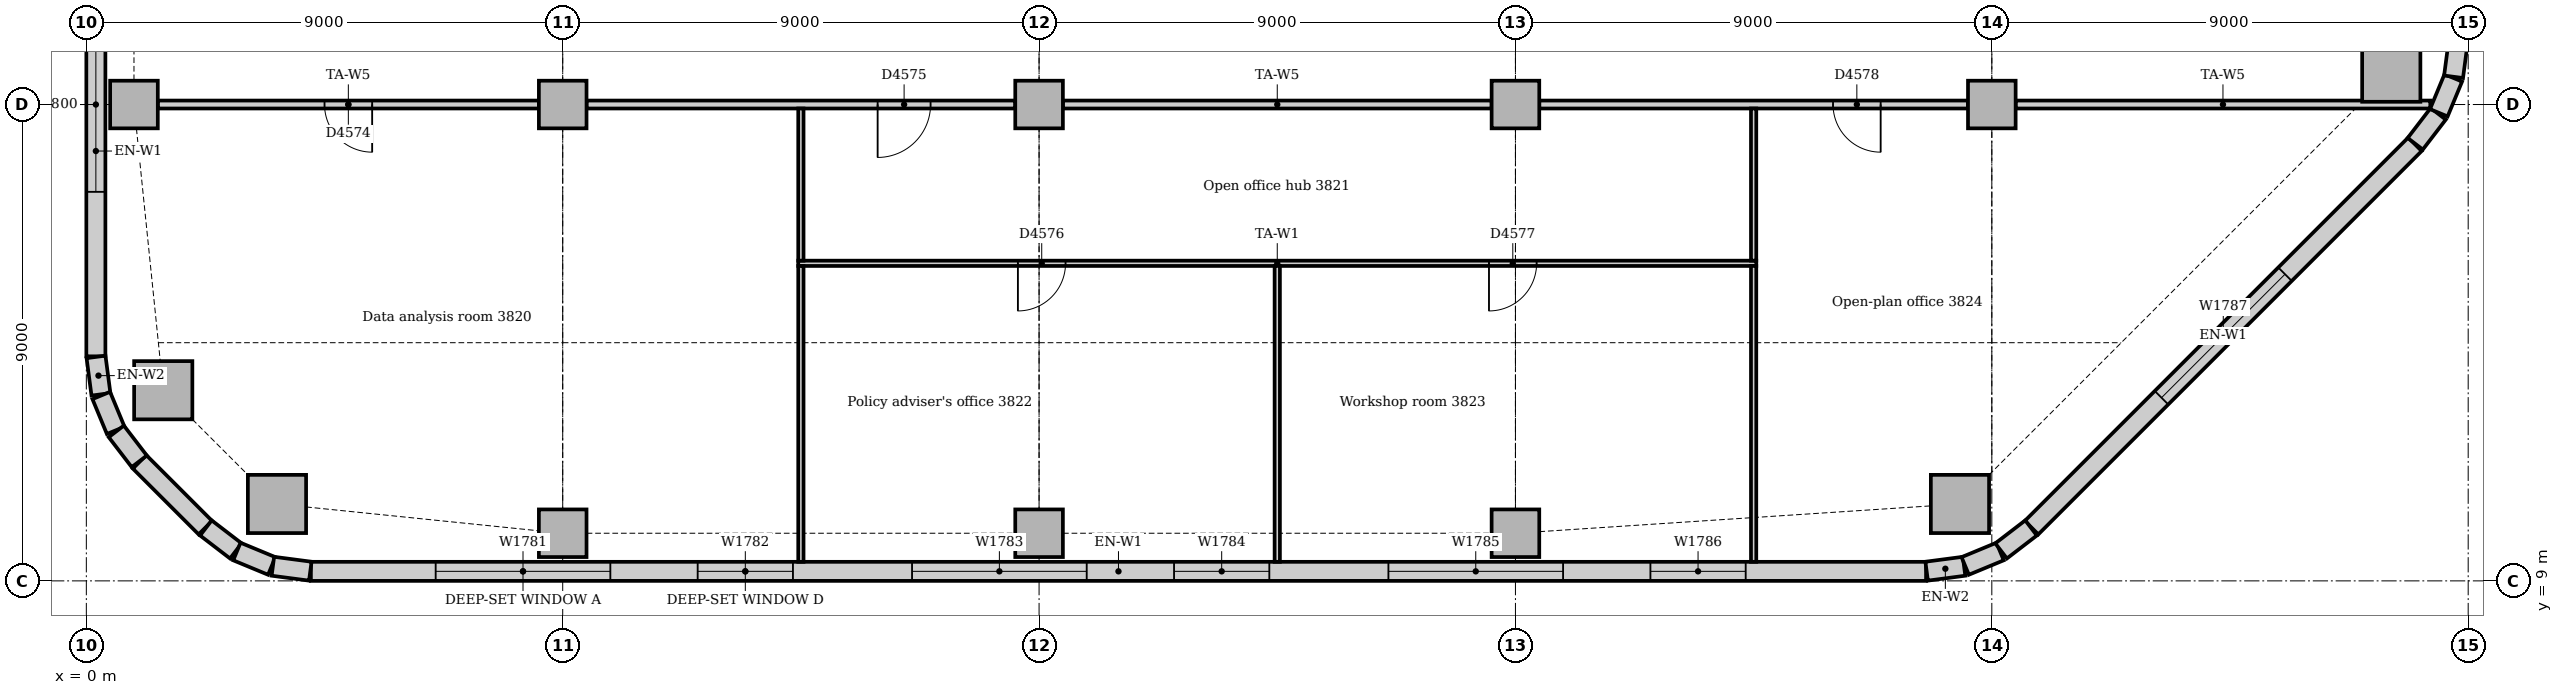
"""IFC4 building model, lengths in metres.
Left out: names, types, materials, properties, quantities, classifications, styles, units other than length and angle.
Written with IfcOpenShell. Run it as: python <this file> out.ifc"""

import sys

from ifc_helpers import new_model, si_unit, direction, frame, frame_2d, origin, origin_2d, place, context, subcontext, project, spatial, rectangle, extrude, element, fill, save


model = new_model("IFC4")
c1 = context("Model", 3, precision=1e-05, world=origin(), true_north=direction((0.0, 1.0)))
c2 = subcontext(c1, "Body", "Model", "MODEL_VIEW")
j1 = project(units=[si_unit("LENGTHUNIT", "METRE"), si_unit("PLANEANGLEUNIT", "RADIAN")], contexts=[c1])
p1 = place(None, origin())
s1 = spatial("IfcSite", under=j1, at=p1, CompositionType="ELEMENT")
p2 = place(p1, origin())
s2 = spatial("IfcBuilding", under=s1, at=p2, CompositionType="ELEMENT")
p3 = place(p2, frame((0.0, 0.0, 161.0)))
s3 = spatial("IfcBuildingStorey", under=s2, at=p3, CompositionType="ELEMENT", Elevation=161.0)
for number, where, z_axis, x_axis in (
    (1, (3.602, 10.453, 0.0), (0.0, 0.0, 1.0), (1.0, 0.0, 0.0)),
    (2, (35.398, 10.453, 0.0), (0.0, 0.0, 1.0), (1.0, 0.0, 0.0)),
    (3, (43.547, 18.602, 0.0), (0.0, 0.0, 1.0), (1.0, 0.0, 0.0)),
    (4, (1.453, 12.602, 0.0), (0.0, 0.0, 1.0), (1.0, 0.0, 0.0)),
):
    element("IfcColumn", number, at=place(p3, frame(where, z_axis=z_axis, x_axis=x_axis)), inside=s3, PredefinedType="COLUMN", context=c2, shape_type="SweptSolid", body=[
        extrude(rectangle(XDim=1.1, YDim=1.1, at=origin_2d()), origin(), (0.0, 0.0, 1.0), 3.85),
    ])
for number, where, z_axis, x_axis in (
    (5, (9.0, 9.9, 0.0), (0.0, 0.0, 1.0), (1.0, 0.0, 0.0)),
    (6, (18.0, 9.9, 0.0), (0.0, 0.0, 1.0), (1.0, 0.0, 0.0)),
    (7, (27.0, 9.9, 0.0), (0.0, 0.0, 1.0), (1.0, 0.0, 0.0)),
    (8, (0.9, 18.0, 0.0), (0.0, 0.0, 1.0), (1.0, 0.0, 0.0)),
    (9, (9.0, 18.0, 0.0), (0.0, 0.0, 1.0), (1.0, 0.0, 0.0)),
    (10, (18.0, 18.0, 0.0), (0.0, 0.0, 1.0), (1.0, 0.0, 0.0)),
    (11, (27.0, 18.0, 0.0), (0.0, 0.0, 1.0), (1.0, 0.0, 0.0)),
    (12, (36.0, 18.0, 0.0), (0.0, 0.0, 1.0), (1.0, 0.0, 0.0)),
):
    element("IfcColumn", number, at=place(p3, frame(where, z_axis=z_axis, x_axis=x_axis)), inside=s3, PredefinedType="COLUMN", context=c2, shape_type="SweptSolid", body=[
        extrude(rectangle(XDim=0.9, YDim=0.9, at=origin_2d()), origin(), (0.0, 0.0, 1.0), 3.85),
    ])
p4 = place(p3, frame((4.243, 9.18, 0.0), z_axis=(0.0, 0.0, 1.0), x_axis=(1.0, 0.0, 0.0)))
e13 = element("IfcWall", 13, at=p4, inside=s3, PredefinedType="STANDARD", context=c2, shape_type="SweptSolid", body=[
    extrude(rectangle(XDim=30.515, YDim=0.36, at=frame_2d((15.257, 0.0))), origin(), (0.0, 0.0, 1.0), 3.85),
])
p5 = place(p4, frame((2.357, 0.0, 0.9)))
e14 = element("IfcOpeningElement", 14, at=p5, cuts=e13, PredefinedType="OPENING", context=c2, shape_type="SweptSolid", body=[
    extrude(rectangle(XDim=3.3, YDim=1.6, at=frame_2d((1.65, 0.8))), frame((0.0, 0.19, 0.0), z_axis=(0.0, -1.0, 0.0), x_axis=(1.0, 0.0, 0.0)), (0.0, 0.0, 1.0), 0.38),
])
p6 = place(p4, frame((7.307, 0.0, 0.9)))
e15 = element("IfcOpeningElement", 15, at=p6, cuts=e13, PredefinedType="OPENING", context=c2, shape_type="SweptSolid", body=[
    extrude(rectangle(XDim=1.8, YDim=1.6, at=frame_2d((0.9, 0.8))), frame((0.0, 0.19, 0.0), z_axis=(0.0, -1.0, 0.0), x_axis=(1.0, 0.0, 0.0)), (0.0, 0.0, 1.0), 0.38),
])
p7 = place(p4, frame((11.357, 0.0, 0.9)))
e16 = element("IfcOpeningElement", 16, at=p7, cuts=e13, PredefinedType="OPENING", context=c2, shape_type="SweptSolid", body=[
    extrude(rectangle(XDim=3.3, YDim=1.6, at=frame_2d((1.65, 0.8))), frame((0.0, 0.19, 0.0), z_axis=(0.0, -1.0, 0.0), x_axis=(1.0, 0.0, 0.0)), (0.0, 0.0, 1.0), 0.38),
])
p8 = place(p4, frame((16.307, 0.0, 0.9)))
e17 = element("IfcOpeningElement", 17, at=p8, cuts=e13, PredefinedType="OPENING", context=c2, shape_type="SweptSolid", body=[
    extrude(rectangle(XDim=1.8, YDim=1.6, at=frame_2d((0.9, 0.8))), frame((0.0, 0.19, 0.0), z_axis=(0.0, -1.0, 0.0), x_axis=(1.0, 0.0, 0.0)), (0.0, 0.0, 1.0), 0.38),
])
p9 = place(p4, frame((20.357, 0.0, 0.9)))
e18 = element("IfcOpeningElement", 18, at=p9, cuts=e13, PredefinedType="OPENING", context=c2, shape_type="SweptSolid", body=[
    extrude(rectangle(XDim=3.3, YDim=1.6, at=frame_2d((1.65, 0.8))), frame((0.0, 0.19, 0.0), z_axis=(0.0, -1.0, 0.0), x_axis=(1.0, 0.0, 0.0)), (0.0, 0.0, 1.0), 0.38),
])
p10 = place(p4, frame((25.307, 0.0, 0.9)))
e19 = element("IfcOpeningElement", 19, at=p10, cuts=e13, PredefinedType="OPENING", context=c2, shape_type="SweptSolid", body=[
    extrude(rectangle(XDim=1.8, YDim=1.6, at=frame_2d((0.9, 0.8))), frame((0.0, 0.19, 0.0), z_axis=(0.0, -1.0, 0.0), x_axis=(1.0, 0.0, 0.0)), (0.0, 0.0, 1.0), 0.38),
])
p11 = place(p3, frame((36.751, 10.006, 0.0), z_axis=(0.0, 0.0, 1.0), x_axis=(0.707106781187, 0.707106781187, 0.0)))
e20 = element("IfcWall", 20, at=p11, inside=s3, PredefinedType="STANDARD", context=c2, shape_type="SweptSolid", body=[
    extrude(rectangle(XDim=10.243, YDim=0.36, at=frame_2d((5.121, 0.0))), origin(), (0.0, 0.0, 1.0), 3.85),
])
p12 = place(p11, frame((3.471, 0.0, 0.9)))
e21 = element("IfcOpeningElement", 21, at=p12, cuts=e20, PredefinedType="OPENING", context=c2, shape_type="SweptSolid", body=[
    extrude(rectangle(XDim=3.3, YDim=1.6, at=frame_2d((1.65, 0.8))), frame((0.0, 0.19, 0.0), z_axis=(0.0, -1.0, 0.0), x_axis=(1.0, 0.0, 0.0)), (0.0, 0.0, 1.0), 0.38),
])
p13 = place(p3, frame((0.18, 21.0, 0.0), z_axis=(0.0, 0.0, 1.0), x_axis=(0.0, -1.0, 0.0)))
e22 = element("IfcWall", 22, at=p13, inside=s3, PredefinedType="STANDARD", context=c2, shape_type="SweptSolid", body=[
    extrude(rectangle(XDim=7.757, YDim=0.36, at=frame_2d((3.879, 0.0))), origin(), (0.0, 0.0, 1.0), 3.85),
])
p14 = place(p13, frame((1.35, 0.0, 0.9)))
e23 = element("IfcOpeningElement", 23, at=p14, cuts=e22, PredefinedType="OPENING", context=c2, shape_type="SweptSolid", body=[
    extrude(rectangle(XDim=3.3, YDim=1.6, at=frame_2d((1.65, 0.8))), frame((0.0, 0.19, 0.0), z_axis=(0.0, -1.0, 0.0), x_axis=(1.0, 0.0, 0.0)), (0.0, 0.0, 1.0), 0.38),
])
p15 = place(p3, frame((1.006, 11.249, 0.0), z_axis=(0.0, 0.0, 1.0), x_axis=(0.707106781187, -0.707106781187, 0.0)))
e24 = element("IfcWall", 24, at=p15, inside=s3, PredefinedType="STANDARD", context=c2, shape_type="SweptSolid", body=[
    extrude(rectangle(XDim=1.757, YDim=0.36, at=frame_2d((0.879, 0.0))), origin(), (0.0, 0.0, 1.0), 3.85),
])
for number, where, z_axis, x_axis in (
    (25, (34.769, 9.183, 0.0), (0.0, 0.0, 1.0), (0.991, 0.131, 0.0)),
    (26, (35.497, 9.282, 0.0), (0.0, 0.0, 1.0), (0.924, 0.383, 0.0)),
):
    element("IfcWall", number, at=place(p3, frame(where, z_axis=z_axis, x_axis=x_axis)), inside=s3, PredefinedType="STANDARD", context=c2, shape_type="SweptSolid", body=[
        extrude(rectangle(XDim=0.713, YDim=0.36, at=frame_2d((0.356, 0.0))), origin(), (0.0, 0.0, 1.0), 3.85),
    ])
for number, where, z_axis, x_axis in (
    (27, (36.175, 9.566, 0.0), (0.0, 0.0, 1.0), (0.793, 0.609, 0.0)),
    (28, (44.0, 17.259, 0.0), (0.0, 0.0, 1.0), (0.609, 0.793, 0.0)),
):
    element("IfcWall", number, at=place(p3, frame(where, z_axis=z_axis, x_axis=x_axis)), inside=s3, PredefinedType="STANDARD", context=c2, shape_type="SweptSolid", body=[
        extrude(rectangle(XDim=0.713, YDim=0.36, at=frame_2d((0.357, 0.0))), origin(), (0.0, 0.0, 1.0), 3.85),
    ])
for number, where, z_axis, x_axis in (
    (29, (44.445, 17.844, 0.0), (0.0, 0.0, 1.0), (0.383, 0.924, 0.0)),
    (30, (44.724, 18.524, 0.0), (0.0, 0.0, 1.0), (0.131, 0.991, 0.0)),
    (31, (0.183, 13.231, 0.0), (0.0, 0.0, 1.0), (0.131, -0.991, 0.0)),
    (32, (0.282, 12.503, 0.0), (0.0, 0.0, 1.0), (0.383, -0.924, 0.0)),
):
    element("IfcWall", number, at=place(p3, frame(where, z_axis=z_axis, x_axis=x_axis)), inside=s3, PredefinedType="STANDARD", context=c2, shape_type="SweptSolid", body=[
        extrude(rectangle(XDim=0.713, YDim=0.36, at=frame_2d((0.356, 0.0))), origin(), (0.0, 0.0, 1.0), 3.85),
    ])
for number, where, z_axis, x_axis in (
    (33, (0.566, 11.825, 0.0), (0.0, 0.0, 1.0), (0.609, -0.793, 0.0)),
    (34, (2.259, 10.0, 0.0), (0.0, 0.0, 1.0), (0.793, -0.609, 0.0)),
):
    element("IfcWall", number, at=place(p3, frame(where, z_axis=z_axis, x_axis=x_axis)), inside=s3, PredefinedType="STANDARD", context=c2, shape_type="SweptSolid", body=[
        extrude(rectangle(XDim=0.713, YDim=0.36, at=frame_2d((0.357, 0.0))), origin(), (0.0, 0.0, 1.0), 3.85),
    ])
for number, where, z_axis, x_axis in (
    (35, (2.844, 9.555, 0.0), (0.0, 0.0, 1.0), (0.924, -0.383, 0.0)),
    (36, (3.524, 9.276, 0.0), (0.0, 0.0, 1.0), (0.991, -0.131, 0.0)),
):
    element("IfcWall", number, at=place(p3, frame(where, z_axis=z_axis, x_axis=x_axis)), inside=s3, PredefinedType="STANDARD", context=c2, shape_type="SweptSolid", body=[
        extrude(rectangle(XDim=0.713, YDim=0.36, at=frame_2d((0.356, 0.0))), origin(), (0.0, 0.0, 1.0), 3.85),
    ])
p16 = place(p3, frame((1.35, 18.0, 0.0), z_axis=(0.0, 0.0, 1.0), x_axis=(1.0, 0.0, 0.0)))
e37 = element("IfcWall", 37, at=p16, inside=s3, PredefinedType="PARTITIONING", context=c2, shape_type="SweptSolid", body=[
    extrude(rectangle(XDim=7.2, YDim=0.15, at=frame_2d((3.6, 0.0))), origin(), (0.0, 0.0, 1.0), 3.262),
])
p17 = place(p16, frame((3.15, 0.0, 0.0)))
e38 = element("IfcOpeningElement", 38, at=p17, cuts=e37, PredefinedType="OPENING", context=c2, shape_type="SweptSolid", body=[
    extrude(rectangle(XDim=0.9, YDim=2.1, at=frame_2d((0.45, 1.05))), frame((0.0, 0.085, 0.0), z_axis=(0.0, -1.0, 0.0), x_axis=(1.0, 0.0, 0.0)), (0.0, 0.0, 1.0), 0.17),
])
p18 = place(p3, frame((9.45, 18.0, 0.0), z_axis=(0.0, 0.0, 1.0), x_axis=(1.0, 0.0, 0.0)))
e39 = element("IfcWall", 39, at=p18, inside=s3, PredefinedType="PARTITIONING", context=c2, shape_type="SweptSolid", body=[
    extrude(rectangle(XDim=8.1, YDim=0.15, at=frame_2d((4.05, 0.0))), origin(), (0.0, 0.0, 1.0), 3.262),
])
p19 = place(p18, frame((5.5, 0.0, 0.0)))
e40 = element("IfcOpeningElement", 40, at=p19, cuts=e39, PredefinedType="OPENING", context=c2, shape_type="SweptSolid", body=[
    extrude(rectangle(XDim=1.0, YDim=2.1, at=frame_2d((0.5, 1.05))), frame((0.0, 0.085, 0.0), z_axis=(0.0, -1.0, 0.0), x_axis=(1.0, 0.0, 0.0)), (0.0, 0.0, 1.0), 0.17),
])
p20 = place(p3, frame((18.45, 18.0, 0.0), z_axis=(0.0, 0.0, 1.0), x_axis=(1.0, 0.0, 0.0)))
e41 = element("IfcWall", 41, at=p20, inside=s3, PredefinedType="PARTITIONING", context=c2, shape_type="SweptSolid", body=[
    extrude(rectangle(XDim=8.1, YDim=0.15, at=frame_2d((4.05, 0.0))), origin(), (0.0, 0.0, 1.0), 3.262),
])
p21 = place(p3, frame((27.45, 18.0, 0.0), z_axis=(0.0, 0.0, 1.0), x_axis=(1.0, 0.0, 0.0)))
e42 = element("IfcWall", 42, at=p21, inside=s3, PredefinedType="PARTITIONING", context=c2, shape_type="SweptSolid", body=[
    extrude(rectangle(XDim=8.1, YDim=0.15, at=frame_2d((4.05, 0.0))), origin(), (0.0, 0.0, 1.0), 3.262),
])
p22 = place(p21, frame((5.55, 0.0, 0.0)))
e43 = element("IfcOpeningElement", 43, at=p22, cuts=e42, PredefinedType="OPENING", context=c2, shape_type="SweptSolid", body=[
    extrude(rectangle(XDim=0.9, YDim=2.1, at=frame_2d((0.45, 1.05))), frame((0.0, 0.085, 0.0), z_axis=(0.0, -1.0, 0.0), x_axis=(1.0, 0.0, 0.0)), (0.0, 0.0, 1.0), 0.17),
])
p23 = place(p3, frame((36.45, 18.0, 0.0), z_axis=(0.0, 0.0, 1.0), x_axis=(1.0, 0.0, 0.0)))
e44 = element("IfcWall", 44, at=p23, inside=s3, PredefinedType="PARTITIONING", context=c2, shape_type="SweptSolid", body=[
    extrude(rectangle(XDim=7.834, YDim=0.15, at=frame_2d((3.917, 0.0))), origin(), (0.0, 0.0, 1.0), 3.35),
])
p24 = place(p3, frame((13.45, 15.0, 0.0), z_axis=(0.0, 0.0, 1.0), x_axis=(1.0, 0.0, 0.0)))
e45 = element("IfcWall", 45, at=p24, inside=s3, PredefinedType="PARTITIONING", context=c2, shape_type="SweptSolid", body=[
    extrude(rectangle(XDim=18.1, YDim=0.1, at=frame_2d((9.05, 0.0))), origin(), (0.0, 0.0, 1.0), 3.85),
])
p25 = place(p24, frame((4.15, 0.0, 0.0)))
e46 = element("IfcOpeningElement", 46, at=p25, cuts=e45, PredefinedType="OPENING", context=c2, shape_type="SweptSolid", body=[
    extrude(rectangle(XDim=0.9, YDim=2.1, at=frame_2d((0.45, 1.05))), frame((0.0, 0.06, 0.0), z_axis=(0.0, -1.0, 0.0), x_axis=(1.0, 0.0, 0.0)), (0.0, 0.0, 1.0), 0.12),
])
p26 = place(p24, frame((13.05, 0.0, 0.0)))
e47 = element("IfcOpeningElement", 47, at=p26, cuts=e45, PredefinedType="OPENING", context=c2, shape_type="SweptSolid", body=[
    extrude(rectangle(XDim=0.9, YDim=2.1, at=frame_2d((0.45, 1.05))), frame((0.0, 0.06, 0.0), z_axis=(0.0, -1.0, 0.0), x_axis=(1.0, 0.0, 0.0)), (0.0, 0.0, 1.0), 0.12),
])
p27 = place(p3, frame((13.5, 15.05, 0.0), z_axis=(0.0, 0.0, 1.0), x_axis=(0.0, 1.0, 0.0)))
e48 = element("IfcWall", 48, at=p27, inside=s3, PredefinedType="PARTITIONING", context=c2, shape_type="SweptSolid", body=[
    extrude(rectangle(XDim=2.875, YDim=0.1, at=frame_2d((1.438, 0.0))), origin(), (0.0, 0.0, 1.0), 3.85),
])
p28 = place(p3, frame((13.5, 9.36, 0.0), z_axis=(0.0, 0.0, 1.0), x_axis=(0.0, 1.0, 0.0)))
e49 = element("IfcWall", 49, at=p28, inside=s3, PredefinedType="PARTITIONING", context=c2, shape_type="SweptSolid", body=[
    extrude(rectangle(XDim=5.59, YDim=0.1, at=frame_2d((2.795, 0.0))), origin(), (0.0, 0.0, 1.0), 3.85),
])
p29 = place(p3, frame((31.5, 15.05, 0.0), z_axis=(0.0, 0.0, 1.0), x_axis=(0.0, 1.0, 0.0)))
e50 = element("IfcWall", 50, at=p29, inside=s3, PredefinedType="PARTITIONING", context=c2, shape_type="SweptSolid", body=[
    extrude(rectangle(XDim=2.875, YDim=0.1, at=frame_2d((1.438, 0.0))), origin(), (0.0, 0.0, 1.0), 3.85),
])
for number, where, z_axis, x_axis in (
    (51, (31.5, 9.36, 0.0), (0.0, 0.0, 1.0), (0.0, 1.0, 0.0)),
    (52, (22.5, 9.36, 0.0), (0.0, 0.0, 1.0), (0.0, 1.0, 0.0)),
):
    element("IfcWall", number, at=place(p3, frame(where, z_axis=z_axis, x_axis=x_axis)), inside=s3, PredefinedType="PARTITIONING", context=c2, shape_type="SweptSolid", body=[
        extrude(rectangle(XDim=5.59, YDim=0.1, at=frame_2d((2.795, 0.0))), origin(), (0.0, 0.0, 1.0), 3.85),
    ])
p30 = place(p5, origin())
e53 = element("IfcWindow", 53, at=p30, inside=s3, PartitioningType="SINGLE_PANEL", PredefinedType="WINDOW", context=c2, shape_type="SweptSolid", body=[
    extrude(rectangle(XDim=3.3, YDim=1.6, at=frame_2d((1.65, 0.8))), frame((0.0, 0.13, 0.0), z_axis=(0.0, -1.0, 0.0), x_axis=(1.0, 0.0, 0.0)), (0.0, 0.0, 1.0), 0.06),
])
fill(e14, e53)
p31 = place(p6, origin())
e54 = element("IfcWindow", 54, at=p31, inside=s3, PartitioningType="SINGLE_PANEL", PredefinedType="WINDOW", context=c2, shape_type="SweptSolid", body=[
    extrude(rectangle(XDim=1.8, YDim=1.6, at=frame_2d((0.9, 0.8))), frame((0.0, 0.13, 0.0), z_axis=(0.0, -1.0, 0.0), x_axis=(1.0, 0.0, 0.0)), (0.0, 0.0, 1.0), 0.06),
])
fill(e15, e54)
p32 = place(p7, origin())
e55 = element("IfcWindow", 55, at=p32, inside=s3, PartitioningType="SINGLE_PANEL", PredefinedType="WINDOW", context=c2, shape_type="SweptSolid", body=[
    extrude(rectangle(XDim=3.3, YDim=1.6, at=frame_2d((1.65, 0.8))), frame((0.0, 0.13, 0.0), z_axis=(0.0, -1.0, 0.0), x_axis=(1.0, 0.0, 0.0)), (0.0, 0.0, 1.0), 0.06),
])
fill(e16, e55)
p33 = place(p8, origin())
e56 = element("IfcWindow", 56, at=p33, inside=s3, PartitioningType="SINGLE_PANEL", PredefinedType="WINDOW", context=c2, shape_type="SweptSolid", body=[
    extrude(rectangle(XDim=1.8, YDim=1.6, at=frame_2d((0.9, 0.8))), frame((0.0, 0.13, 0.0), z_axis=(0.0, -1.0, 0.0), x_axis=(1.0, 0.0, 0.0)), (0.0, 0.0, 1.0), 0.06),
])
fill(e17, e56)
p34 = place(p9, origin())
e57 = element("IfcWindow", 57, at=p34, inside=s3, PartitioningType="SINGLE_PANEL", PredefinedType="WINDOW", context=c2, shape_type="SweptSolid", body=[
    extrude(rectangle(XDim=3.3, YDim=1.6, at=frame_2d((1.65, 0.8))), frame((0.0, 0.13, 0.0), z_axis=(0.0, -1.0, 0.0), x_axis=(1.0, 0.0, 0.0)), (0.0, 0.0, 1.0), 0.06),
])
fill(e18, e57)
p35 = place(p10, origin())
e58 = element("IfcWindow", 58, at=p35, inside=s3, PartitioningType="SINGLE_PANEL", PredefinedType="WINDOW", context=c2, shape_type="SweptSolid", body=[
    extrude(rectangle(XDim=1.8, YDim=1.6, at=frame_2d((0.9, 0.8))), frame((0.0, 0.13, 0.0), z_axis=(0.0, -1.0, 0.0), x_axis=(1.0, 0.0, 0.0)), (0.0, 0.0, 1.0), 0.06),
])
fill(e19, e58)
p36 = place(p12, origin())
e59 = element("IfcWindow", 59, at=p36, inside=s3, PartitioningType="SINGLE_PANEL", PredefinedType="WINDOW", context=c2, shape_type="SweptSolid", body=[
    extrude(rectangle(XDim=3.3, YDim=1.6, at=frame_2d((1.65, 0.8))), frame((0.0, 0.13, 0.0), z_axis=(0.0, -1.0, 0.0), x_axis=(1.0, 0.0, 0.0)), (0.0, 0.0, 1.0), 0.06),
])
fill(e21, e59)
p37 = place(p14, origin())
e60 = element("IfcWindow", 60, at=p37, inside=s3, PartitioningType="SINGLE_PANEL", PredefinedType="WINDOW", context=c2, shape_type="SweptSolid", body=[
    extrude(rectangle(XDim=3.3, YDim=1.6, at=frame_2d((1.65, 0.8))), frame((0.0, 0.13, 0.0), z_axis=(0.0, -1.0, 0.0), x_axis=(1.0, 0.0, 0.0)), (0.0, 0.0, 1.0), 0.06),
])
fill(e23, e60)
p38 = place(p17, frame((0.9, 0.0, 0.0), z_axis=(0.0, 0.0, 1.0), x_axis=(-1.0, 0.0, 0.0)))
e61 = element("IfcDoor", 61, at=p38, inside=s3, OperationType="SINGLE_SWING_LEFT", PredefinedType="DOOR", context=c2, shape_type="SweptSolid", body=[
    extrude(rectangle(XDim=0.9, YDim=2.1, at=frame_2d((0.45, 1.05))), frame((0.0, 0.025, 0.0), z_axis=(0.0, -1.0, 0.0), x_axis=(1.0, 0.0, 0.0)), (0.0, 0.0, 1.0), 0.05),
])
fill(e38, e61)
p39 = place(p19, frame((1.0, 0.0, 0.0), z_axis=(0.0, 0.0, 1.0), x_axis=(-1.0, 0.0, 0.0)))
e62 = element("IfcDoor", 62, at=p39, inside=s3, OperationType="SINGLE_SWING_RIGHT", PredefinedType="DOOR", context=c2, shape_type="SweptSolid", body=[
    extrude(rectangle(XDim=1.0, YDim=2.1, at=frame_2d((0.5, 1.05))), frame((0.0, 0.025, 0.0), z_axis=(0.0, -1.0, 0.0), x_axis=(1.0, 0.0, 0.0)), (0.0, 0.0, 1.0), 0.05),
])
fill(e40, e62)
p40 = place(p25, frame((0.9, 0.0, 0.0), z_axis=(0.0, 0.0, 1.0), x_axis=(-1.0, 0.0, 0.0)))
e63 = element("IfcDoor", 63, at=p40, inside=s3, OperationType="SINGLE_SWING_RIGHT", PredefinedType="DOOR", context=c2, shape_type="SweptSolid", body=[
    extrude(rectangle(XDim=0.9, YDim=2.1, at=frame_2d((0.45, 1.05))), frame((0.0, 0.025, 0.0), z_axis=(0.0, -1.0, 0.0), x_axis=(1.0, 0.0, 0.0)), (0.0, 0.0, 1.0), 0.05),
])
fill(e46, e63)
p41 = place(p26, frame((0.9, 0.0, 0.0), z_axis=(0.0, 0.0, 1.0), x_axis=(-1.0, 0.0, 0.0)))
e64 = element("IfcDoor", 64, at=p41, inside=s3, OperationType="SINGLE_SWING_RIGHT", PredefinedType="DOOR", context=c2, shape_type="SweptSolid", body=[
    extrude(rectangle(XDim=0.9, YDim=2.1, at=frame_2d((0.45, 1.05))), frame((0.0, 0.025, 0.0), z_axis=(0.0, -1.0, 0.0), x_axis=(1.0, 0.0, 0.0)), (0.0, 0.0, 1.0), 0.05),
])
fill(e47, e64)
p42 = place(p22, frame((0.9, 0.0, 0.0), z_axis=(0.0, 0.0, 1.0), x_axis=(-1.0, 0.0, 0.0)))
e65 = element("IfcDoor", 65, at=p42, inside=s3, OperationType="SINGLE_SWING_LEFT", PredefinedType="DOOR", context=c2, shape_type="SweptSolid", body=[
    extrude(rectangle(XDim=0.9, YDim=2.1, at=frame_2d((0.45, 1.05))), frame((0.0, 0.025, 0.0), z_axis=(0.0, -1.0, 0.0), x_axis=(1.0, 0.0, 0.0)), (0.0, 0.0, 1.0), 0.05),
])
fill(e43, e65)
save(model, sys.argv[1])
